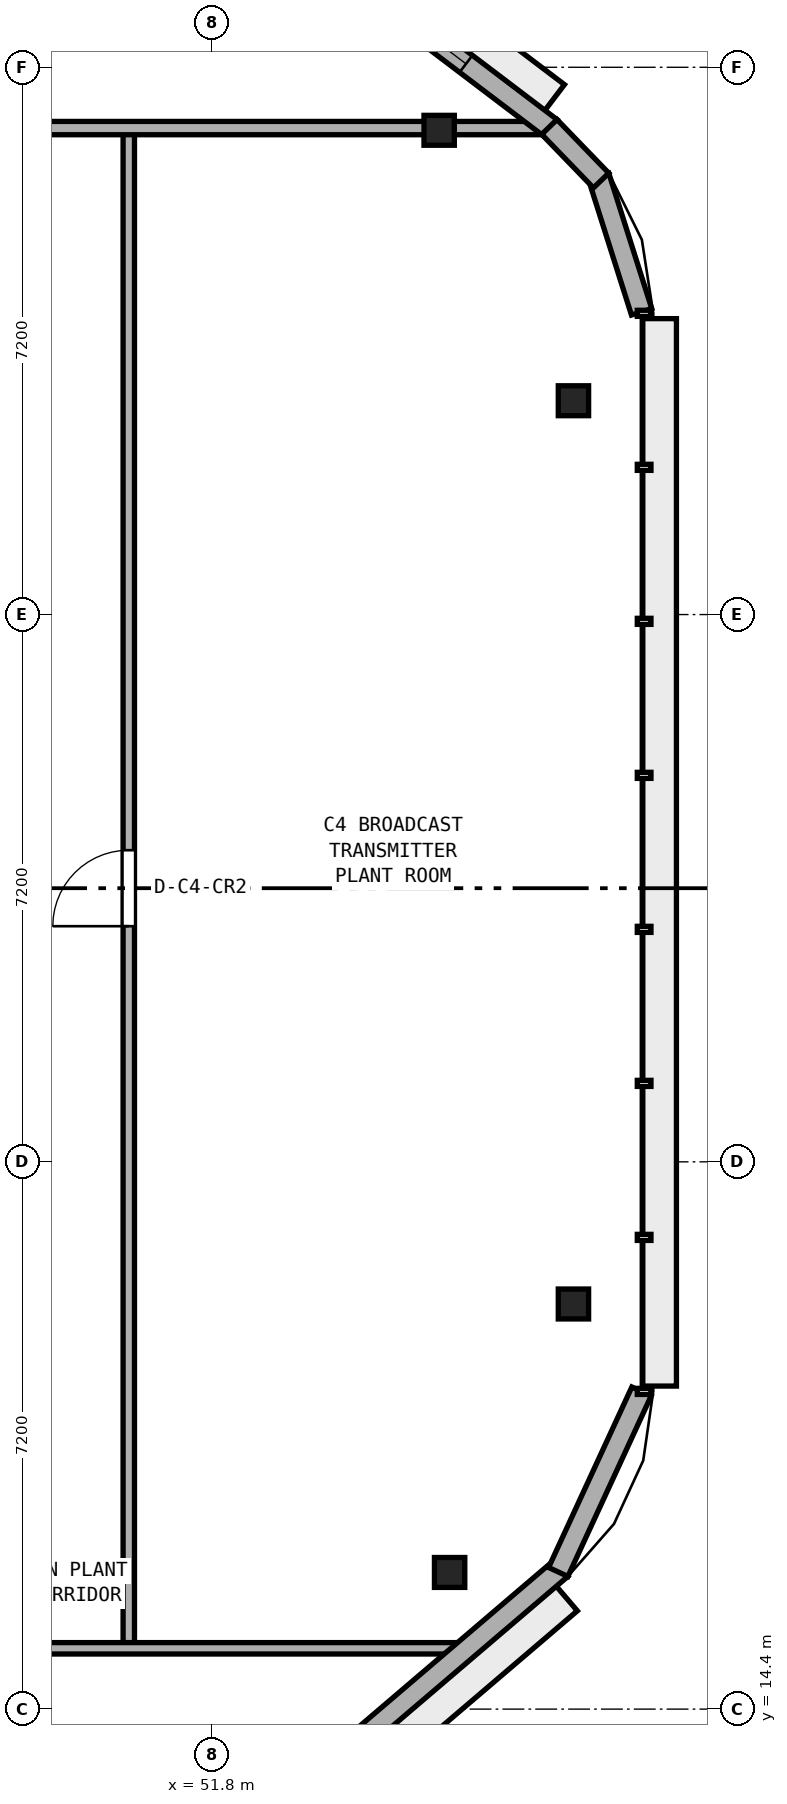
"""IFC4 building model, lengths in metres.
Left out: names, types, materials, properties, quantities, classifications, styles, units other than length and angle.
Written with IfcOpenShell. Run it as: python <this file> out.ifc"""

import sys

from ifc_helpers import new_model, si_unit, direction, frame, frame_2d, origin, origin_2d, place, context, subcontext, project, spatial, rectangle, i_section, extrude, element, fill, save


model = new_model("IFC4")
c1 = context("Model", 3, precision=1e-05, world=origin(), true_north=direction((0.0, 1.0)))
c2 = subcontext(c1, "Body", "Model", "MODEL_VIEW")
j1 = project(units=[si_unit("LENGTHUNIT", "METRE"), si_unit("PLANEANGLEUNIT", "RADIAN")], contexts=[c1])
p1 = place(None, origin())
s1 = spatial("IfcSite", under=j1, at=p1, CompositionType="ELEMENT")
p2 = place(p1, origin())
s2 = spatial("IfcBuilding", under=s1, at=p2, CompositionType="ELEMENT")
p3 = place(p2, frame((0.0, 0.0, 325.4)))
s3 = spatial("IfcBuildingStorey", under=s2, at=p3, CompositionType="ELEMENT", Elevation=325.4)
for number, where, z_axis, x_axis in (
    (1, (54.921, 16.198, 0.0), (0.0, 0.0, 1.0), (1.0, 0.0, 0.0)),
    (2, (56.55, 19.73, 0.0), (0.0, 0.0, 1.0), (1.0, 0.0, 0.0)),
    (3, (56.55, 31.613, 0.0), (0.0, 0.0, 1.0), (1.0, 0.0, 0.0)),
    (4, (54.783, 35.171, 0.0), (0.0, 0.0, 1.0), (1.0, 0.0, 0.0)),
):
    element("IfcColumn", number, at=place(p3, frame(where, z_axis=z_axis, x_axis=x_axis)), inside=s3, PredefinedType="COLUMN", context=c2, shape_type="SweptSolid", body=[
        extrude(i_section(OverallWidth=0.399, OverallDepth=0.394, WebThickness=0.023, FlangeThickness=0.037, at=origin_2d()), origin(), (0.0, 0.0, 1.0), 4.0),
    ])
p4 = place(p3, frame((50.7, 15.2, 0.0), z_axis=(0.0, 0.0, 1.0), x_axis=(0.0, 1.0, 0.0)))
e5 = element("IfcWall", 5, at=p4, inside=s3, PredefinedType="PARTITIONING", context=c2, shape_type="SweptSolid", body=[
    extrude(rectangle(XDim=20.0, YDim=0.15, at=frame_2d((10.0, 0.0))), origin(), (0.0, 0.0, 1.0), 3.72),
])
p5 = place(p4, frame((9.5, 0.0, 0.0)))
e6 = element("IfcOpeningElement", 6, at=p5, cuts=e5, PredefinedType="OPENING", context=c2, shape_type="SweptSolid", body=[
    extrude(rectangle(XDim=1.0, YDim=2.12, at=frame_2d((0.5, 1.06))), frame((0.0, 0.085, 0.0), z_axis=(0.0, -1.0, 0.0), x_axis=(1.0, 0.0, 0.0)), (0.0, 0.0, 1.0), 0.17),
])
p6 = place(p3, frame((24.464, 15.2, 0.0), z_axis=(0.0, 0.0, 1.0), x_axis=(1.0, 0.0, 0.0)))
e7 = element("IfcWall", 7, at=p6, inside=s3, PredefinedType="PARTITIONING", context=c2, shape_type="SweptSolid", body=[
    extrude(rectangle(XDim=30.765, YDim=0.15, at=frame_2d((15.383, 0.0))), origin(), (0.0, 0.0, 1.0), 3.72),
])
p7 = place(p6, frame((14.536, 0.0, 0.0)))
e8 = element("IfcOpeningElement", 8, at=p7, cuts=e7, PredefinedType="OPENING", context=c2, shape_type="SweptSolid", body=[
    extrude(rectangle(XDim=1.0, YDim=2.12, at=frame_2d((0.5, 1.06))), frame((0.0, 0.085, 0.0), z_axis=(0.0, -1.0, 0.0), x_axis=(1.0, 0.0, 0.0)), (0.0, 0.0, 1.0), 0.17),
])
p8 = place(p3, frame((25.074, 35.2, 0.0), z_axis=(0.0, 0.0, 1.0), x_axis=(1.0, 0.0, 0.0)))
e9 = element("IfcWall", 9, at=p8, inside=s3, PredefinedType="PARTITIONING", context=c2, shape_type="SweptSolid", body=[
    extrude(rectangle(XDim=31.228, YDim=0.175, at=frame_2d((15.614, 0.0))), origin(), (0.0, 0.0, 1.0), 3.72),
])
p9 = place(p8, frame((13.926, 0.0, 0.0)))
e10 = element("IfcOpeningElement", 10, at=p9, cuts=e9, PredefinedType="OPENING", context=c2, shape_type="SweptSolid", body=[
    extrude(rectangle(XDim=1.0, YDim=2.12, at=frame_2d((0.5, 1.06))), frame((0.0, 0.097, 0.0), z_axis=(0.0, -1.0, 0.0), x_axis=(1.0, 0.0, 0.0)), (0.0, 0.0, 1.0), 0.195),
])
p10 = place(p3, frame((47.371, 8.558, 0.0), z_axis=(0.0, 0.0, 1.0), x_axis=(0.760637685394, 0.649176641261, 0.0)))
e11 = element("IfcWall", 11, at=p10, inside=s3, PredefinedType="STANDARD", context=c2, shape_type="SweptSolid", body=[
    extrude(rectangle(XDim=11.852, YDim=0.28, at=frame_2d((5.926, 0.0))), origin(), (0.0, 0.0, 1.0), 3.72),
])
p11 = place(p10, frame((1.509, 0.0, 0.9)))
e12 = element("IfcOpeningElement", 12, at=p11, cuts=e11, PredefinedType="OPENING", context=c2, shape_type="SweptSolid", body=[
    extrude(rectangle(XDim=1.6, YDim=1.45, at=frame_2d((0.8, 0.725))), frame((0.0, 0.15, 0.0), z_axis=(0.0, -1.0, 0.0), x_axis=(1.0, 0.0, 0.0)), (0.0, 0.0, 1.0), 0.3),
])
p12 = place(p10, frame((5.126, 0.0, 0.9)))
e13 = element("IfcOpeningElement", 13, at=p12, cuts=e11, PredefinedType="OPENING", context=c2, shape_type="SweptSolid", body=[
    extrude(rectangle(XDim=1.6, YDim=1.45, at=frame_2d((0.8, 0.725))), frame((0.0, 0.15, 0.0), z_axis=(0.0, -1.0, 0.0), x_axis=(1.0, 0.0, 0.0)), (0.0, 0.0, 1.0), 0.3),
])
p13 = place(p3, frame((56.25, 35.201, 0.0), z_axis=(0.0, 0.0, 1.0), x_axis=(-0.796694895732, 0.60438170316, 0.0)))
e14 = element("IfcWall", 14, at=p13, inside=s3, PredefinedType="STANDARD", context=c2, shape_type="SweptSolid", body=[
    extrude(rectangle(XDim=11.183, YDim=0.28, at=frame_2d((5.591, 0.0))), origin(), (0.0, 0.0, 1.0), 3.72),
])
p14 = place(p13, frame((1.397, 0.0, 0.9)))
e15 = element("IfcOpeningElement", 15, at=p14, cuts=e14, PredefinedType="OPENING", context=c2, shape_type="SweptSolid", body=[
    extrude(rectangle(XDim=1.6, YDim=1.45, at=frame_2d((0.8, 0.725))), frame((0.0, 0.15, 0.0), z_axis=(0.0, -1.0, 0.0), x_axis=(1.0, 0.0, 0.0)), (0.0, 0.0, 1.0), 0.3),
])
p15 = place(p13, frame((4.792, 0.0, 0.9)))
e16 = element("IfcOpeningElement", 16, at=p15, cuts=e14, PredefinedType="OPENING", context=c2, shape_type="SweptSolid", body=[
    extrude(rectangle(XDim=1.6, YDim=1.45, at=frame_2d((0.8, 0.725))), frame((0.0, 0.15, 0.0), z_axis=(0.0, -1.0, 0.0), x_axis=(1.0, 0.0, 0.0)), (0.0, 0.0, 1.0), 0.3),
])
p16 = place(p13, frame((8.186, 0.0, 0.9)))
e17 = element("IfcOpeningElement", 17, at=p16, cuts=e14, PredefinedType="OPENING", context=c2, shape_type="SweptSolid", body=[
    extrude(rectangle(XDim=1.6, YDim=1.45, at=frame_2d((0.8, 0.725))), frame((0.0, 0.15, 0.0), z_axis=(0.0, -1.0, 0.0), x_axis=(1.0, 0.0, 0.0)), (0.0, 0.0, 1.0), 0.3),
])
p17 = place(p3, frame((56.35, 16.205, 0.0), z_axis=(0.0, 0.0, 1.0), x_axis=(0.418839145957, 0.908060443921, 0.0)))
e18 = element("IfcWall", 18, at=p17, inside=s3, PredefinedType="STANDARD", context=c2, shape_type="SweptSolid", body=[
    extrude(rectangle(XDim=2.615, YDim=0.28, at=frame_2d((1.308, 0.0))), origin(), (0.0, 0.0, 1.0), 3.72),
])
p18 = place(p3, frame((57.447, 32.783, 0.0), z_axis=(0.0, 0.0, 1.0), x_axis=(-0.302530200683, 0.953139799649, 0.0)))
e19 = element("IfcWall", 19, at=p18, inside=s3, PredefinedType="STANDARD", context=c2, shape_type="SweptSolid", body=[
    extrude(rectangle(XDim=1.871, YDim=0.28, at=frame_2d((0.935, 0.0))), origin(), (0.0, 0.0, 1.0), 3.72),
])
p19 = place(p3, frame((56.914, 34.511, 0.0), z_axis=(0.0, 0.0, 1.0), x_axis=(-0.694785794461, 0.719216726595, 0.0)))
e20 = element("IfcWall", 20, at=p19, inside=s3, PredefinedType="STANDARD", context=c2, shape_type="SweptSolid", body=[
    extrude(rectangle(XDim=0.979, YDim=0.28, at=frame_2d((0.49, 0.0))), origin(), (0.0, 0.0, 1.0), 3.72),
])
p20 = place(p5, origin())
e21 = element("IfcDoor", 21, at=p20, inside=s3, OperationType="SINGLE_SWING_LEFT", PredefinedType="DOOR", context=c2, shape_type="SweptSolid", body=[
    extrude(rectangle(XDim=1.0, YDim=2.12, at=frame_2d((0.5, 1.06))), frame((0.0, 0.025, 0.0), z_axis=(0.0, -1.0, 0.0), x_axis=(1.0, 0.0, 0.0)), (0.0, 0.0, 1.0), 0.05),
])
fill(e6, e21)
p21 = place(p14, origin())
e22 = element("IfcWindow", 22, at=p21, inside=s3, PartitioningType="SINGLE_PANEL", PredefinedType="WINDOW", context=c2, shape_type="SweptSolid", body=[
    extrude(rectangle(XDim=1.6, YDim=1.45, at=frame_2d((0.8, 0.725))), frame((0.0, 0.03, 0.0), z_axis=(0.0, -1.0, 0.0), x_axis=(1.0, 0.0, 0.0)), (0.0, 0.0, 1.0), 0.06),
])
fill(e15, e22)
save(model, sys.argv[1])
